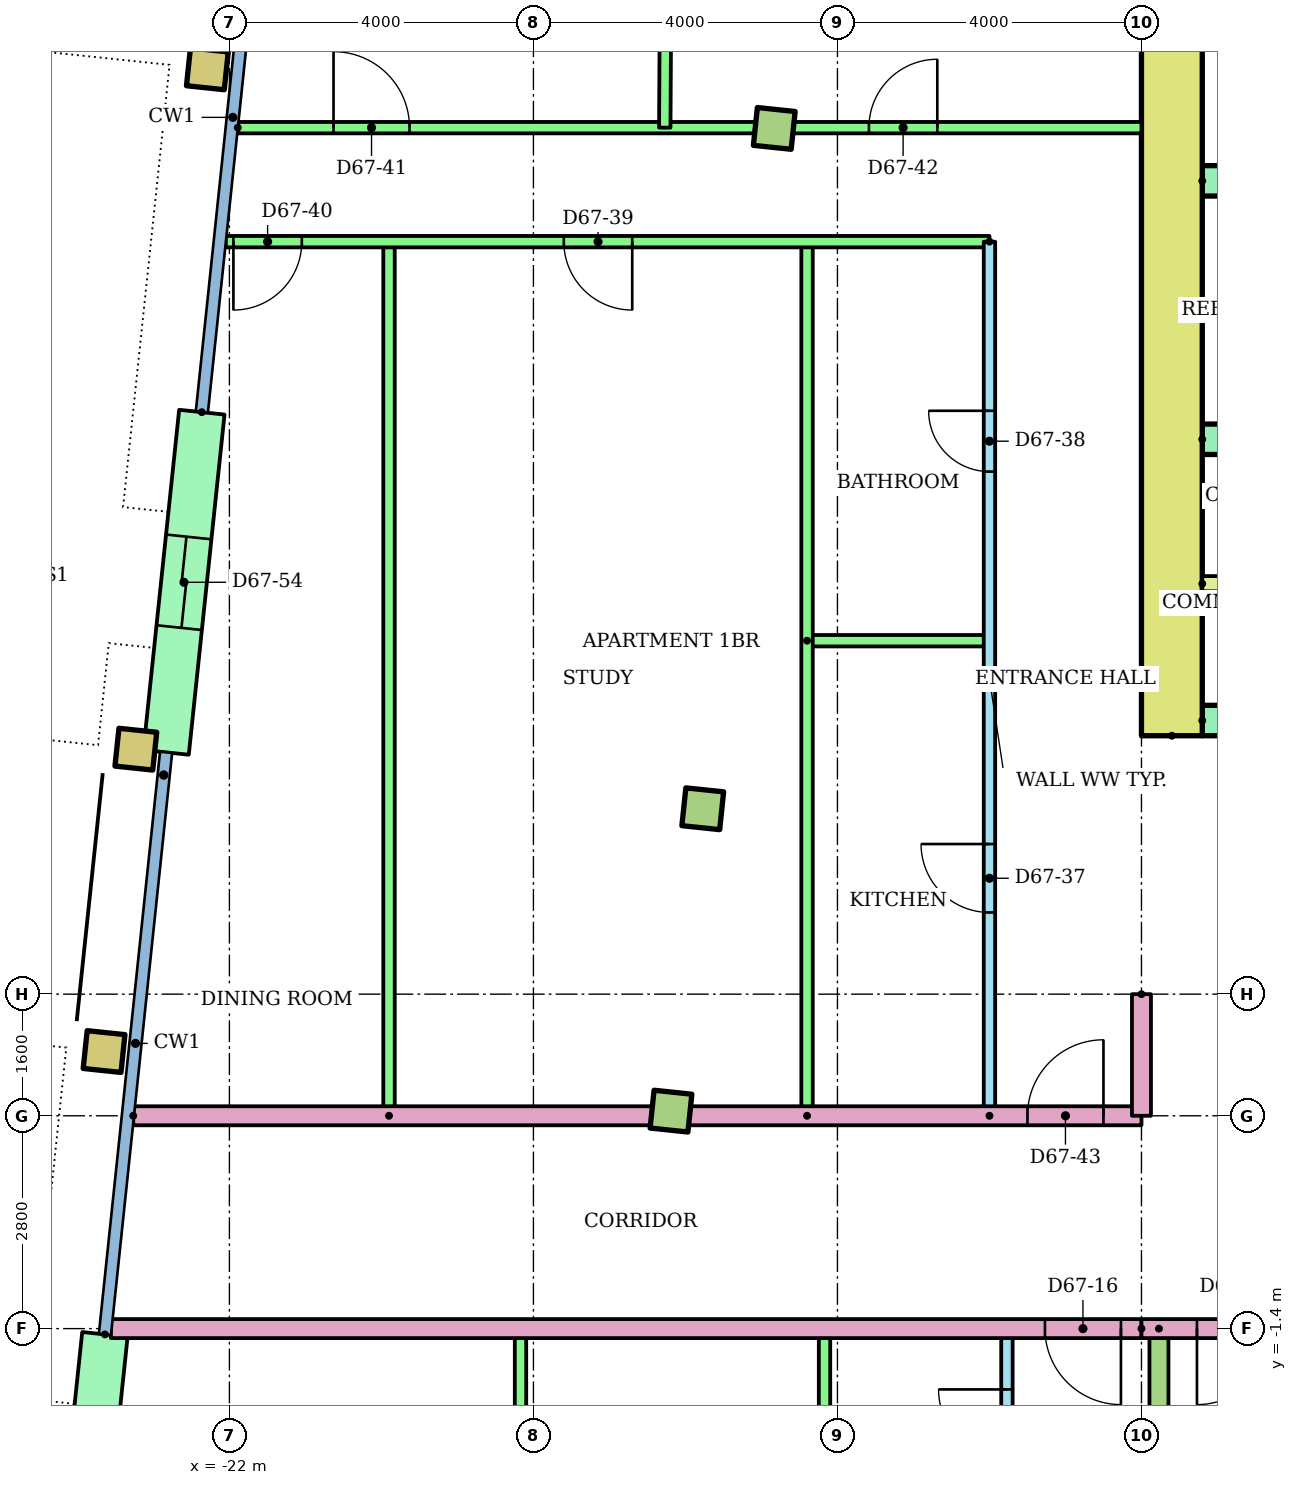
"""IFC4 building model, lengths in metres.
Left out: names, types, materials, properties, quantities, classifications, styles, units other than length and angle.
Written with IfcOpenShell. Run it as: python <this file> out.ifc"""

import sys

from ifc_helpers import new_model, si_unit, direction, frame, frame_2d, origin, origin_2d, place, context, subcontext, project, spatial, rectangle, hollow_rectangle, extrude, element, fill, save


model = new_model("IFC4")
c1 = context("Model", 3, precision=1e-05, world=origin(), true_north=direction((0.0, 1.0)))
c2 = subcontext(c1, "Body", "Model", "MODEL_VIEW")
j1 = project(units=[si_unit("LENGTHUNIT", "METRE"), si_unit("PLANEANGLEUNIT", "RADIAN")], contexts=[c1])
p1 = place(None, origin())
s1 = spatial("IfcSite", under=j1, at=p1, CompositionType="ELEMENT")
p2 = place(p1, origin())
s2 = spatial("IfcBuilding", under=s1, at=p2, CompositionType="ELEMENT")
p3 = place(p2, frame((0.0, 0.0, 259.5)))
s3 = spatial("IfcBuildingStorey", under=s2, at=p3, CompositionType="ELEMENT", Elevation=259.5)
p4 = place(p3, frame((-23.649, 2.245, 0.0), z_axis=(0.0, 0.0, 1.0), x_axis=(0.994521895368, -0.104528463268, 0.0)))
e1 = element("IfcColumn", 1, at=p4, inside=s3, PredefinedType="COLUMN", context=c2, shape_type="SweptSolid", body=[
    extrude(hollow_rectangle(XDim=0.5, YDim=0.5, WallThickness=0.025, at=origin_2d()), origin(), (0.0, 0.0, 1.0), 3.2),
])
p5 = place(p3, frame((-16.19, 1.461, 0.0), z_axis=(0.0, 0.0, 1.0), x_axis=(0.994521895368, -0.104528463268, 0.0)))
e2 = element("IfcColumn", 2, at=p5, inside=s3, PredefinedType="COLUMN", context=c2, shape_type="SweptSolid", body=[
    extrude(rectangle(XDim=0.5, YDim=0.5, at=origin_2d()), origin(), (0.0, 0.0, 1.0), 3.2),
])
p6 = place(p3, frame((-23.231, 6.223, 0.0), z_axis=(0.0, 0.0, 1.0), x_axis=(0.994521895368, -0.104528463268, 0.0)))
e3 = element("IfcColumn", 3, at=p6, inside=s3, PredefinedType="COLUMN", context=c2, shape_type="SweptSolid", body=[
    extrude(hollow_rectangle(XDim=0.5, YDim=0.5, WallThickness=0.025, at=origin_2d()), origin(), (0.0, 0.0, 1.0), 3.2),
])
p7 = place(p3, frame((-15.772, 5.439, 0.0), z_axis=(0.0, 0.0, 1.0), x_axis=(0.994521895368, -0.104528463268, 0.0)))
e4 = element("IfcColumn", 4, at=p7, inside=s3, PredefinedType="COLUMN", context=c2, shape_type="SweptSolid", body=[
    extrude(rectangle(XDim=0.5, YDim=0.5, at=origin_2d()), origin(), (0.0, 0.0, 1.0), 3.2),
])
p8 = place(p3, frame((-22.29, 15.174, 0.0), z_axis=(0.0, 0.0, 1.0), x_axis=(0.994521895368, -0.104528463268, 0.0)))
e5 = element("IfcColumn", 5, at=p8, inside=s3, PredefinedType="COLUMN", context=c2, shape_type="SweptSolid", body=[
    extrude(hollow_rectangle(XDim=0.5, YDim=0.5, WallThickness=0.025, at=origin_2d()), origin(), (0.0, 0.0, 1.0), 3.2),
])
p9 = place(p3, frame((-14.831, 14.39, 0.0), z_axis=(0.0, 0.0, 1.0), x_axis=(0.994521895368, -0.104528463268, 0.0)))
e6 = element("IfcColumn", 6, at=p9, inside=s3, PredefinedType="COLUMN", context=c2, shape_type="SweptSolid", body=[
    extrude(rectangle(XDim=0.5, YDim=0.5, at=origin_2d()), origin(), (0.0, 0.0, 1.0), 3.2),
])
p10 = place(p3, frame((-22.363, 10.657, 0.0), z_axis=(0.0, 0.0, 1.0), x_axis=(-0.104492739125, -0.994525649478, 0.0)))
e7 = element("IfcWall", 7, at=p10, inside=s3, PredefinedType="STANDARD", context=c2, shape_type="SweptSolid", body=[
    extrude(rectangle(XDim=4.5, YDim=0.6, at=frame_2d((2.25, 0.0))), origin(), (0.0, 0.0, 1.0), 2.92),
])
p11 = place(p10, frame((1.65, 0.0, 0.0)))
e8 = element("IfcOpeningElement", 8, at=p11, cuts=e7, PredefinedType="OPENING", context=c2, shape_type="SweptSolid", body=[
    extrude(rectangle(XDim=1.2, YDim=2.1, at=frame_2d((0.6, 1.05))), frame((0.0, 0.31, 0.0), z_axis=(0.0, -1.0, 0.0), x_axis=(1.0, 0.0, 0.0)), (0.0, 0.0, 1.0), 0.62),
])
p12 = place(p3, frame((-23.638, -1.476, 0.0), z_axis=(0.0, 0.0, 1.0), x_axis=(-0.104513052986, -0.994523514933, 0.0)))
e9 = element("IfcWall", 9, at=p12, inside=s3, PredefinedType="STANDARD", context=c2, shape_type="SweptSolid", body=[
    extrude(rectangle(XDim=3.7, YDim=0.6, at=frame_2d((1.85, 0.0))), origin(), (0.0, 0.0, 1.0), 2.92),
])
p13 = place(p12, frame((1.25, 0.0, 0.0)))
e10 = element("IfcOpeningElement", 10, at=p13, cuts=e9, PredefinedType="OPENING", context=c2, shape_type="SweptSolid", body=[
    extrude(rectangle(XDim=1.2, YDim=2.1, at=frame_2d((0.6, 1.05))), frame((0.0, 0.31, 0.0), z_axis=(0.0, -1.0, 0.0), x_axis=(1.0, 0.0, 0.0)), (0.0, 0.0, 1.0), 0.62),
])
p14 = place(p3, frame((-9.6, 6.4, 0.0), z_axis=(0.0, 0.0, 1.0), x_axis=(0.0, 1.0, 0.0)))
e11 = element("IfcWall", 11, at=p14, inside=s3, PredefinedType="SHEAR", context=c2, shape_type="SweptSolid", body=[
    extrude(rectangle(XDim=13.6, YDim=0.8, at=frame_2d((6.8, 0.0))), origin(), (0.0, 0.0, 1.0), 2.92),
])
p15 = place(p3, frame((-9.2, 6.6, 0.0)))
e12 = element("IfcWall", 12, at=p15, inside=s3, PredefinedType="SHEAR", context=c2, shape_type="SweptSolid", body=[
    extrude(rectangle(XDim=18.4, YDim=0.4, at=frame_2d((9.2, 0.0))), origin(), (0.0, 0.0, 1.0), 2.92),
])
p16 = place(p15, frame((8.3, 0.0, 0.0)))
e13 = element("IfcOpeningElement", 13, at=p16, cuts=e12, PredefinedType="OPENING", context=c2, shape_type="SweptSolid", body=[
    extrude(rectangle(XDim=1.8, YDim=2.1, at=frame_2d((0.9, 1.05))), frame((0.0, 0.21, 0.0), z_axis=(0.0, -1.0, 0.0), x_axis=(1.0, 0.0, 0.0)), (0.0, 0.0, 1.0), 0.42),
])
p17 = place(p15, frame((3.8, 0.0, 0.0)))
e14 = element("IfcOpeningElement", 14, at=p17, cuts=e12, PredefinedType="OPENING", context=c2, shape_type="SweptSolid", body=[
    extrude(rectangle(XDim=1.8, YDim=2.1, at=frame_2d((0.9, 1.05))), frame((0.0, 0.21, 0.0), z_axis=(0.0, -1.0, 0.0), x_axis=(1.0, 0.0, 0.0)), (0.0, 0.0, 1.0), 0.42),
])
p18 = place(p15, frame((12.8, 0.0, 0.0)))
e15 = element("IfcOpeningElement", 15, at=p18, cuts=e12, PredefinedType="OPENING", context=c2, shape_type="SweptSolid", body=[
    extrude(rectangle(XDim=1.8, YDim=2.1, at=frame_2d((0.9, 1.05))), frame((0.0, 0.21, 0.0), z_axis=(0.0, -1.0, 0.0), x_axis=(1.0, 0.0, 0.0)), (0.0, 0.0, 1.0), 0.42),
])
p19 = place(p3, frame((-9.2, 10.3, 0.0)))
e16 = element("IfcWall", 16, at=p19, inside=s3, PredefinedType="SHEAR", context=c2, shape_type="SweptSolid", body=[
    extrude(rectangle(XDim=8.0, YDim=0.4, at=frame_2d((4.0, 0.0))), origin(), (0.0, 0.0, 1.0), 2.92),
])
p20 = place(p19, frame((3.35, 0.0, 0.0)))
e17 = element("IfcOpeningElement", 17, at=p20, cuts=e16, PredefinedType="OPENING", context=c2, shape_type="SweptSolid", body=[
    extrude(rectangle(XDim=1.1, YDim=2.1, at=frame_2d((0.55, 1.05))), frame((0.0, 0.21, 0.0), z_axis=(0.0, -1.0, 0.0), x_axis=(1.0, 0.0, 0.0)), (0.0, 0.0, 1.0), 0.42),
])
p21 = place(p19, frame((6.083, 0.0, 0.0)))
e18 = element("IfcOpeningElement", 18, at=p21, cuts=e16, PredefinedType="OPENING", context=c2, shape_type="SweptSolid", body=[
    extrude(rectangle(XDim=1.1, YDim=2.1, at=frame_2d((0.55, 1.05))), frame((0.0, 0.21, 0.0), z_axis=(0.0, -1.0, 0.0), x_axis=(1.0, 0.0, 0.0)), (0.0, 0.0, 1.0), 0.42),
])
p22 = place(p19, frame((0.917, 0.0, 0.0)))
e19 = element("IfcOpeningElement", 19, at=p22, cuts=e16, PredefinedType="OPENING", context=c2, shape_type="SweptSolid", body=[
    extrude(rectangle(XDim=1.0, YDim=2.1, at=frame_2d((0.5, 1.05))), frame((0.0, 0.21, 0.0), z_axis=(0.0, -1.0, 0.0), x_axis=(1.0, 0.0, 0.0)), (0.0, 0.0, 1.0), 0.42),
])
p23 = place(p3, frame((-9.2, 13.7, 0.0)))
e20 = element("IfcWall", 20, at=p23, inside=s3, PredefinedType="SHEAR", context=c2, shape_type="SweptSolid", body=[
    extrude(rectangle(XDim=8.0, YDim=0.4, at=frame_2d((4.0, 0.0))), origin(), (0.0, 0.0, 1.0), 2.92),
])
p24 = place(p3, frame((-9.2, 8.4, 0.0)))
e21 = element("IfcWall", 21, at=p24, inside=s3, PredefinedType="PARTITIONING", context=c2, shape_type="SweptSolid", body=[
    extrude(rectangle(XDim=3.4, YDim=0.2, at=frame_2d((1.7, 0.0))), origin(), (0.0, 0.0, 1.0), 2.92),
])
p25 = place(p3, frame((-11.77, -5.9, 0.0), z_axis=(0.0, 0.0, 1.0), x_axis=(0.0, 1.0, 0.0)))
e22 = element("IfcWall", 22, at=p25, inside=s3, PredefinedType="PARTITIONING", context=c2, shape_type="SweptSolid", body=[
    extrude(rectangle(XDim=4.5, YDim=0.15, at=frame_2d((2.25, 0.0))), origin(), (0.0, 0.0, 1.0), 2.4),
])
p26 = place(p25, frame((2.8, 0.0, 0.0)))
e23 = element("IfcOpeningElement", 23, at=p26, cuts=e22, PredefinedType="OPENING", context=c2, shape_type="SweptSolid", body=[
    extrude(rectangle(XDim=0.9, YDim=2.1, at=frame_2d((0.45, 1.05))), frame((0.0, 0.085, 0.0), z_axis=(0.0, -1.0, 0.0), x_axis=(1.0, 0.0, 0.0)), (0.0, 0.0, 1.0), 0.17),
])
p27 = place(p25, frame((0.6, 0.0, 0.0)))
e24 = element("IfcOpeningElement", 24, at=p27, cuts=e22, PredefinedType="OPENING", context=c2, shape_type="SweptSolid", body=[
    extrude(rectangle(XDim=0.8, YDim=2.1, at=frame_2d((0.4, 1.05))), frame((0.0, 0.085, 0.0), z_axis=(0.0, -1.0, 0.0), x_axis=(1.0, 0.0, 0.0)), (0.0, 0.0, 1.0), 0.17),
])
for number, where, z_axis, x_axis in (
    (25, (-14.17, -5.9, 0.0), (0.0, 0.0, 1.0), (0.0, 1.0, 0.0)),
    (26, (-18.17, -5.9, 0.0), (0.0, 0.0, 1.0), (0.0, 1.0, 0.0)),
):
    element("IfcWall", number, at=place(p3, frame(where, z_axis=z_axis, x_axis=x_axis)), inside=s3, PredefinedType="PARTITIONING", context=c2, shape_type="SweptSolid", body=[
        extrude(rectangle(XDim=4.5, YDim=0.15, at=frame_2d((2.25, 0.0))), origin(), (0.0, 0.0, 1.0), 2.4),
    ])
p28 = place(p3, frame((-9.77, -1.4, 0.0), z_axis=(0.0, 0.0, 1.0), x_axis=(0.0, -1.0, 0.0)))
e27 = element("IfcWall", 27, at=p28, inside=s3, PredefinedType="PARTITIONING", context=c2, shape_type="SweptSolid", body=[
    extrude(rectangle(XDim=12.504, YDim=0.25, at=frame_2d((6.252, 0.0))), origin(), (0.0, 0.0, 1.0), 2.4),
])
p29 = place(p3, frame((-10.0, -1.4, 0.0), z_axis=(0.0, 0.0, 1.0), x_axis=(-1.0, 0.0, 0.0)))
e28 = element("IfcWall", 28, at=p29, inside=s3, PredefinedType="PARTITIONING", context=c2, shape_type="SweptSolid", body=[
    extrude(rectangle(XDim=13.56, YDim=0.25, at=frame_2d((6.78, 0.0))), origin(), (0.0, 0.0, 1.0), 2.4),
])
p30 = place(p29, frame((0.27, 0.0, 0.0)))
e29 = element("IfcOpeningElement", 29, at=p30, cuts=e28, PredefinedType="OPENING", context=c2, shape_type="SweptSolid", body=[
    extrude(rectangle(XDim=1.0, YDim=2.1, at=frame_2d((0.5, 1.05))), frame((0.0, 0.135, 0.0), z_axis=(0.0, -1.0, 0.0), x_axis=(1.0, 0.0, 0.0)), (0.0, 0.0, 1.0), 0.27),
])
p31 = place(p3, frame((-12.0, 1.4, 0.0), z_axis=(0.0, 0.0, 1.0), x_axis=(0.0, 1.0, 0.0)))
e30 = element("IfcWall", 30, at=p31, inside=s3, PredefinedType="PARTITIONING", context=c2, shape_type="SweptSolid", body=[
    extrude(rectangle(XDim=11.5, YDim=0.15, at=frame_2d((5.75, 0.0))), origin(), (0.0, 0.0, 1.0), 2.4),
])
p32 = place(p31, frame((2.675, 0.0, 0.0)))
e31 = element("IfcOpeningElement", 31, at=p32, cuts=e30, PredefinedType="OPENING", context=c2, shape_type="SweptSolid", body=[
    extrude(rectangle(XDim=0.9, YDim=2.1, at=frame_2d((0.45, 1.05))), frame((0.0, 0.085, 0.0), z_axis=(0.0, -1.0, 0.0), x_axis=(1.0, 0.0, 0.0)), (0.0, 0.0, 1.0), 0.17),
])
p33 = place(p31, frame((8.475, 0.0, 0.0)))
e32 = element("IfcOpeningElement", 32, at=p33, cuts=e30, PredefinedType="OPENING", context=c2, shape_type="SweptSolid", body=[
    extrude(rectangle(XDim=0.8, YDim=2.1, at=frame_2d((0.4, 1.05))), frame((0.0, 0.085, 0.0), z_axis=(0.0, -1.0, 0.0), x_axis=(1.0, 0.0, 0.0)), (0.0, 0.0, 1.0), 0.17),
])
p34 = place(p3, frame((-14.4, 7.65, 0.0)))
e33 = element("IfcWall", 33, at=p34, inside=s3, PredefinedType="PARTITIONING", context=c2, shape_type="SweptSolid", body=[
    extrude(rectangle(XDim=2.4, YDim=0.15, at=frame_2d((1.2, 0.0))), origin(), (0.0, 0.0, 1.0), 2.4),
])
for number, where, z_axis, x_axis in (
    (34, (-14.4, 1.4, 0.0), (0.0, 0.0, 1.0), (0.0, 1.0, 0.0)),
    (35, (-19.9, 1.4, 0.0), (0.0, 0.0, 1.0), (0.0, 1.0, 0.0)),
):
    element("IfcWall", number, at=place(p3, frame(where, z_axis=z_axis, x_axis=x_axis)), inside=s3, PredefinedType="PARTITIONING", context=c2, shape_type="SweptSolid", body=[
        extrude(rectangle(XDim=11.5, YDim=0.15, at=frame_2d((5.75, 0.0))), origin(), (0.0, 0.0, 1.0), 2.4),
    ])
p35 = place(p3, frame((-12.0, 12.9, 0.0), z_axis=(0.0, 0.0, 1.0), x_axis=(-1.0, 0.0, 0.0)))
e36 = element("IfcWall", 36, at=p35, inside=s3, PredefinedType="PARTITIONING", context=c2, shape_type="SweptSolid", body=[
    extrude(rectangle(XDim=10.047, YDim=0.15, at=frame_2d((5.024, 0.0))), origin(), (0.0, 0.0, 1.0), 2.4),
])
p36 = place(p35, frame((4.7, 0.0, 0.0)))
e37 = element("IfcOpeningElement", 37, at=p36, cuts=e36, PredefinedType="OPENING", context=c2, shape_type="SweptSolid", body=[
    extrude(rectangle(XDim=0.9, YDim=2.1, at=frame_2d((0.45, 1.05))), frame((0.0, 0.085, 0.0), z_axis=(0.0, -1.0, 0.0), x_axis=(1.0, 0.0, 0.0)), (0.0, 0.0, 1.0), 0.17),
])
p37 = place(p35, frame((9.047, 0.0, 0.0)))
e38 = element("IfcOpeningElement", 38, at=p37, cuts=e36, PredefinedType="OPENING", context=c2, shape_type="SweptSolid", body=[
    extrude(rectangle(XDim=0.9, YDim=2.1, at=frame_2d((0.45, 1.05))), frame((0.0, 0.085, 0.0), z_axis=(0.0, -1.0, 0.0), x_axis=(1.0, 0.0, 0.0)), (0.0, 0.0, 1.0), 0.17),
])
p38 = place(p3, frame((-21.89, 14.4, 0.0)))
e39 = element("IfcWall", 39, at=p38, inside=s3, PredefinedType="PARTITIONING", context=c2, shape_type="SweptSolid", body=[
    extrude(rectangle(XDim=11.89, YDim=0.15, at=frame_2d((5.945, 0.0))), origin(), (0.0, 0.0, 1.0), 2.4),
])
p39 = place(p38, frame((1.26, 0.0, 0.0)))
e40 = element("IfcOpeningElement", 40, at=p39, cuts=e39, PredefinedType="OPENING", context=c2, shape_type="SweptSolid", body=[
    extrude(rectangle(XDim=1.0, YDim=2.1, at=frame_2d((0.5, 1.05))), frame((0.0, 0.085, 0.0), z_axis=(0.0, -1.0, 0.0), x_axis=(1.0, 0.0, 0.0)), (0.0, 0.0, 1.0), 0.17),
])
p40 = place(p38, frame((8.304, 0.0, 0.0)))
e41 = element("IfcOpeningElement", 41, at=p40, cuts=e39, PredefinedType="OPENING", context=c2, shape_type="SweptSolid", body=[
    extrude(rectangle(XDim=0.9, YDim=2.1, at=frame_2d((0.45, 1.05))), frame((0.0, 0.085, 0.0), z_axis=(0.0, -1.0, 0.0), x_axis=(1.0, 0.0, 0.0)), (0.0, 0.0, 1.0), 0.17),
])
p41 = place(p3, frame((-16.222, 22.61, 0.0), z_axis=(0.0, 0.0, 1.0), x_axis=(-0.006095634594, -0.999981421447, 0.0)))
e42 = element("IfcWall", 42, at=p41, inside=s3, PredefinedType="PARTITIONING", context=c2, shape_type="SweptSolid", body=[
    extrude(rectangle(XDim=8.211, YDim=0.15, at=frame_2d((4.105, 0.0))), origin(), (0.0, 0.0, 1.0), 2.4),
])
p42 = place(p3, frame((-23.265, 1.4, 0.0)))
e43 = element("IfcWall", 43, at=p42, inside=s3, PredefinedType="PARTITIONING", context=c2, shape_type="SweptSolid", body=[
    extrude(rectangle(XDim=13.265, YDim=0.25, at=frame_2d((6.633, 0.0))), origin(), (0.0, 0.0, 1.0), 2.4),
])
p43 = place(p42, frame((11.765, 0.0, 0.0)))
e44 = element("IfcOpeningElement", 44, at=p43, cuts=e43, PredefinedType="OPENING", context=c2, shape_type="SweptSolid", body=[
    extrude(rectangle(XDim=1.0, YDim=2.1, at=frame_2d((0.5, 1.05))), frame((0.0, 0.135, 0.0), z_axis=(0.0, -1.0, 0.0), x_axis=(1.0, 0.0, 0.0)), (0.0, 0.0, 1.0), 0.27),
])
p44 = place(p3, frame((10.0, -1.4, 0.0), z_axis=(0.0, 0.0, 1.0), x_axis=(-1.0, 0.0, 0.0)))
e45 = element("IfcWall", 45, at=p44, inside=s3, PredefinedType="PARTITIONING", context=c2, shape_type="SweptSolid", body=[
    extrude(rectangle(XDim=20.0, YDim=0.25, at=frame_2d((10.0, 0.0))), origin(), (0.0, 0.0, 1.0), 2.4),
])
p45 = place(p44, frame((18.27, 0.0, 0.0)))
e46 = element("IfcOpeningElement", 46, at=p45, cuts=e45, PredefinedType="OPENING", context=c2, shape_type="SweptSolid", body=[
    extrude(rectangle(XDim=1.0, YDim=2.1, at=frame_2d((0.5, 1.05))), frame((0.0, 0.135, 0.0), z_axis=(0.0, -1.0, 0.0), x_axis=(1.0, 0.0, 0.0)), (0.0, 0.0, 1.0), 0.27),
])
p46 = place(p3, frame((-10.0, 3.0, 0.0), z_axis=(0.0, 0.0, 1.0), x_axis=(0.0, -1.0, 0.0)))
e47 = element("IfcWall", 47, at=p46, inside=s3, PredefinedType="PARTITIONING", context=c2, shape_type="SweptSolid", body=[
    extrude(rectangle(XDim=1.6, YDim=0.25, at=frame_2d((0.8, 0.0))), origin(), (0.0, 0.0, 1.0), 2.4),
])
p47 = place(p26, origin())
e48 = element("IfcDoor", 48, at=p47, inside=s3, OperationType="SINGLE_SWING_RIGHT", PredefinedType="DOOR", context=c2, shape_type="SweptSolid", body=[
    extrude(rectangle(XDim=0.9, YDim=2.1, at=frame_2d((0.45, 1.05))), frame((0.0, 0.025, 0.0), z_axis=(0.0, -1.0, 0.0), x_axis=(1.0, 0.0, 0.0)), (0.0, 0.0, 1.0), 0.05),
])
fill(e23, e48)
p48 = place(p30, origin())
e49 = element("IfcDoor", 49, at=p48, inside=s3, OperationType="SINGLE_SWING_LEFT", PredefinedType="DOOR", context=c2, shape_type="SweptSolid", body=[
    extrude(rectangle(XDim=1.0, YDim=2.1, at=frame_2d((0.5, 1.05))), frame((0.0, 0.025, 0.0), z_axis=(0.0, -1.0, 0.0), x_axis=(1.0, 0.0, 0.0)), (0.0, 0.0, 1.0), 0.05),
])
fill(e29, e49)
p49 = place(p45, origin())
e50 = element("IfcDoor", 50, at=p49, inside=s3, OperationType="SINGLE_SWING_RIGHT", PredefinedType="DOOR", context=c2, shape_type="SweptSolid", body=[
    extrude(rectangle(XDim=1.0, YDim=2.1, at=frame_2d((0.5, 1.05))), frame((0.0, 0.025, 0.0), z_axis=(0.0, -1.0, 0.0), x_axis=(1.0, 0.0, 0.0)), (0.0, 0.0, 1.0), 0.05),
])
fill(e46, e50)
p50 = place(p32, origin())
e51 = element("IfcDoor", 51, at=p50, inside=s3, OperationType="SINGLE_SWING_RIGHT", PredefinedType="DOOR", context=c2, shape_type="SweptSolid", body=[
    extrude(rectangle(XDim=0.9, YDim=2.1, at=frame_2d((0.45, 1.05))), frame((0.0, 0.025, 0.0), z_axis=(0.0, -1.0, 0.0), x_axis=(1.0, 0.0, 0.0)), (0.0, 0.0, 1.0), 0.05),
])
fill(e31, e51)
p51 = place(p33, origin())
e52 = element("IfcDoor", 52, at=p51, inside=s3, OperationType="SINGLE_SWING_RIGHT", PredefinedType="DOOR", context=c2, shape_type="SweptSolid", body=[
    extrude(rectangle(XDim=0.8, YDim=2.1, at=frame_2d((0.4, 1.05))), frame((0.0, 0.025, 0.0), z_axis=(0.0, -1.0, 0.0), x_axis=(1.0, 0.0, 0.0)), (0.0, 0.0, 1.0), 0.05),
])
fill(e32, e52)
p52 = place(p36, origin())
e53 = element("IfcDoor", 53, at=p52, inside=s3, OperationType="SINGLE_SWING_LEFT", PredefinedType="DOOR", context=c2, shape_type="SweptSolid", body=[
    extrude(rectangle(XDim=0.9, YDim=2.1, at=frame_2d((0.45, 1.05))), frame((0.0, 0.025, 0.0), z_axis=(0.0, -1.0, 0.0), x_axis=(1.0, 0.0, 0.0)), (0.0, 0.0, 1.0), 0.05),
])
fill(e37, e53)
p53 = place(p37, origin())
e54 = element("IfcDoor", 54, at=p53, inside=s3, OperationType="SINGLE_SWING_RIGHT", PredefinedType="DOOR", context=c2, shape_type="SweptSolid", body=[
    extrude(rectangle(XDim=0.9, YDim=2.1, at=frame_2d((0.45, 1.05))), frame((0.0, 0.025, 0.0), z_axis=(0.0, -1.0, 0.0), x_axis=(1.0, 0.0, 0.0)), (0.0, 0.0, 1.0), 0.05),
])
fill(e38, e54)
p54 = place(p39, origin())
e55 = element("IfcDoor", 55, at=p54, inside=s3, OperationType="SINGLE_SWING_LEFT", PredefinedType="DOOR", context=c2, shape_type="SweptSolid", body=[
    extrude(rectangle(XDim=1.0, YDim=2.1, at=frame_2d((0.5, 1.05))), frame((0.0, 0.025, 0.0), z_axis=(0.0, -1.0, 0.0), x_axis=(1.0, 0.0, 0.0)), (0.0, 0.0, 1.0), 0.05),
])
fill(e40, e55)
p55 = place(p40, origin())
e56 = element("IfcDoor", 56, at=p55, inside=s3, OperationType="SINGLE_SWING_RIGHT", PredefinedType="DOOR", context=c2, shape_type="SweptSolid", body=[
    extrude(rectangle(XDim=0.9, YDim=2.1, at=frame_2d((0.45, 1.05))), frame((0.0, 0.025, 0.0), z_axis=(0.0, -1.0, 0.0), x_axis=(1.0, 0.0, 0.0)), (0.0, 0.0, 1.0), 0.05),
])
fill(e41, e56)
p56 = place(p43, origin())
e57 = element("IfcDoor", 57, at=p56, inside=s3, OperationType="SINGLE_SWING_RIGHT", PredefinedType="DOOR", context=c2, shape_type="SweptSolid", body=[
    extrude(rectangle(XDim=1.0, YDim=2.1, at=frame_2d((0.5, 1.05))), frame((0.0, 0.025, 0.0), z_axis=(0.0, -1.0, 0.0), x_axis=(1.0, 0.0, 0.0)), (0.0, 0.0, 1.0), 0.05),
])
fill(e44, e57)
p57 = place(p11, origin())
e58 = element("IfcDoor", 58, at=p57, inside=s3, OperationType="SLIDING_TO_LEFT", PredefinedType="DOOR", context=c2, shape_type="SweptSolid", body=[
    extrude(rectangle(XDim=1.2, YDim=2.1, at=frame_2d((0.6, 1.05))), frame((0.0, 0.025, 0.0), z_axis=(0.0, -1.0, 0.0), x_axis=(1.0, 0.0, 0.0)), (0.0, 0.0, 1.0), 0.05),
])
fill(e8, e58)
save(model, sys.argv[1])
